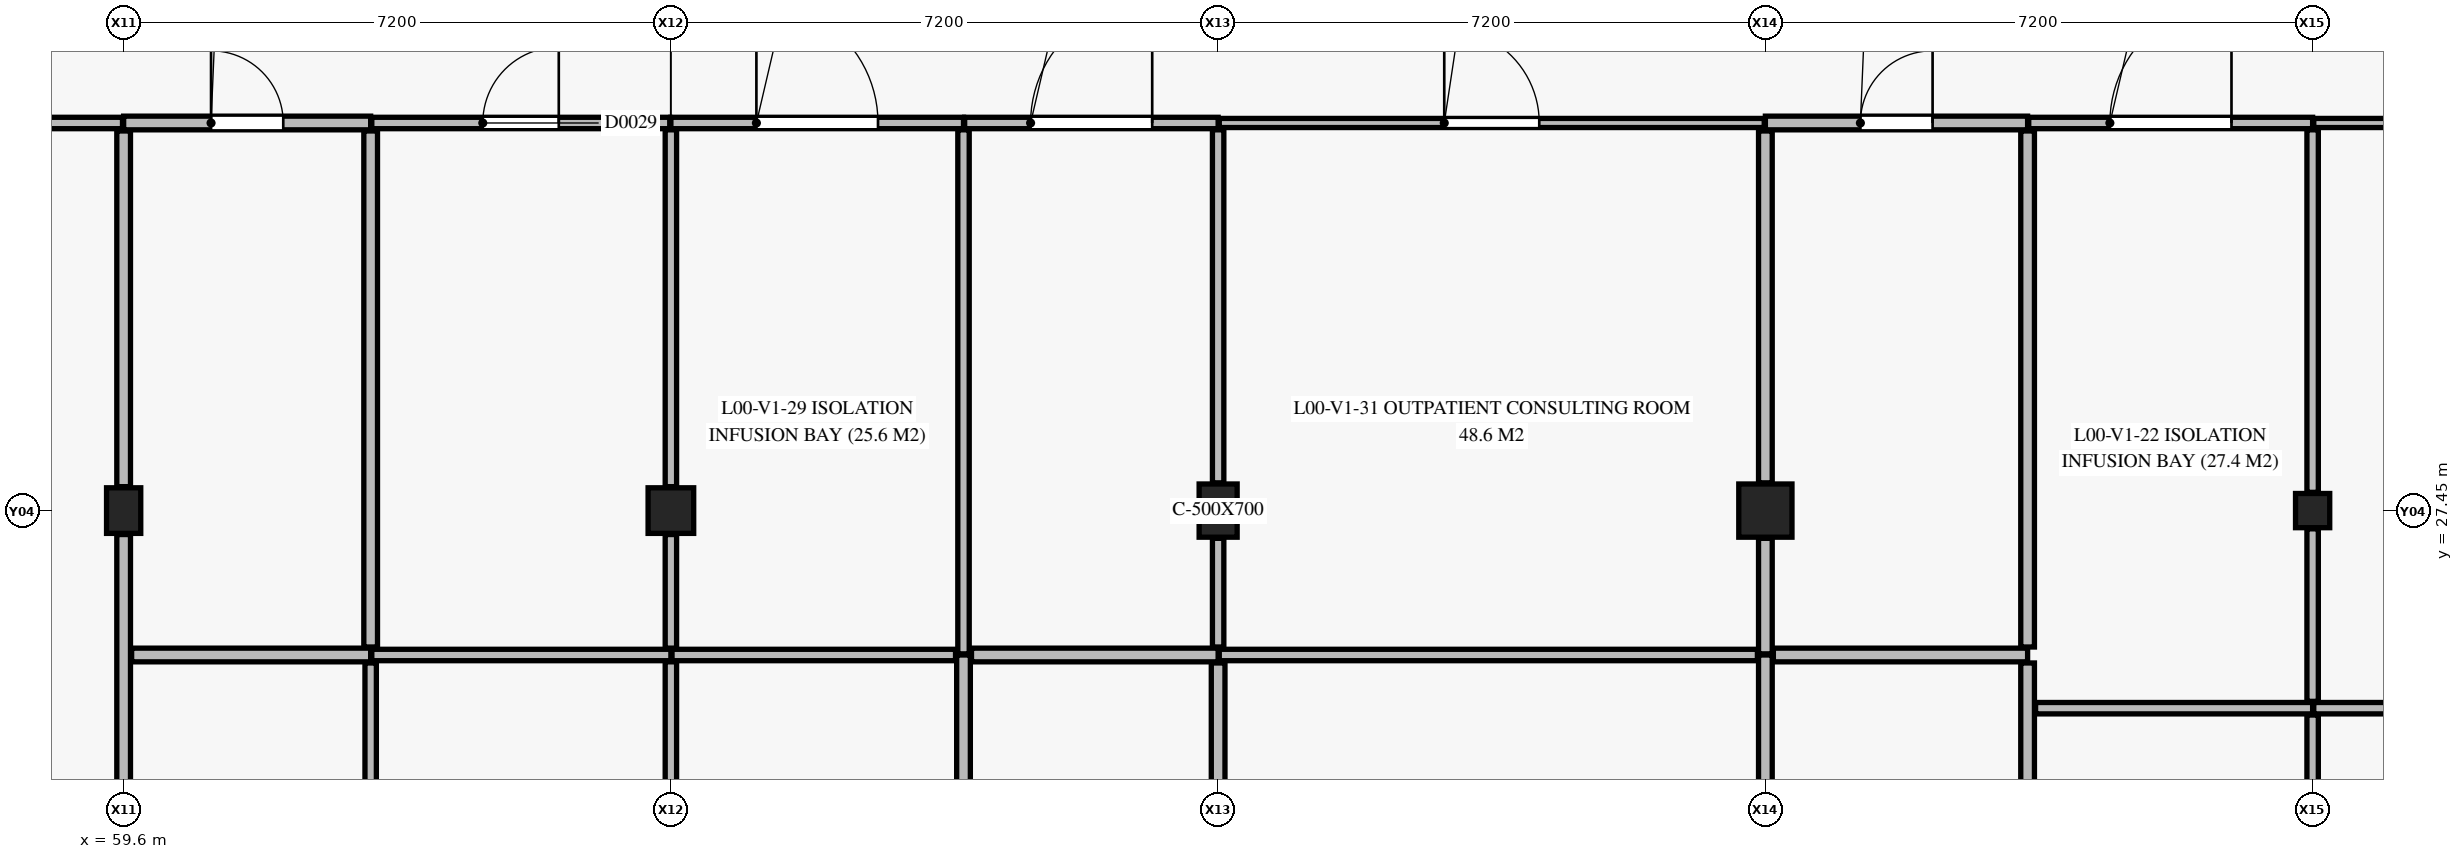
"""IFC4 building model, lengths in metres.
Left out: names, types, materials, properties, quantities, classifications, styles, units other than length and angle.
Written with IfcOpenShell. Run it as: python <this file> out.ifc"""

import sys

from ifc_helpers import new_model, si_unit, direction, frame, frame_2d, origin, origin_2d, place, context, subcontext, project, spatial, rectangle, extrude, element, fill, save


model = new_model("IFC4")
c1 = context("Model", 3, precision=1e-05, world=origin(), true_north=direction((0.0, 1.0)))
c2 = subcontext(c1, "Body", "Model", "MODEL_VIEW")
j1 = project(units=[si_unit("LENGTHUNIT", "METRE"), si_unit("PLANEANGLEUNIT", "RADIAN")], contexts=[c1])
p1 = place(None, origin())
s1 = spatial("IfcSite", under=j1, at=p1, CompositionType="ELEMENT")
p2 = place(p1, origin())
s2 = spatial("IfcBuilding", under=s1, at=p2, CompositionType="ELEMENT")
p3 = place(p2, origin())
s3 = spatial("IfcBuildingStorey", under=s2, at=p3, CompositionType="ELEMENT", Elevation=0.0)
p4 = place(p3, frame((59.6, 27.45, 0.0), z_axis=(0.0, 0.0, 1.0), x_axis=(1.0, 0.0, 0.0)))
e1 = element("IfcColumn", 1, at=p4, inside=s3, PredefinedType="COLUMN", context=c2, shape_type="SweptSolid", body=[
    extrude(rectangle(XDim=0.45, YDim=0.6, at=origin_2d()), origin(), (0.0, 0.0, 1.0), 4.8),
])
p5 = place(p3, frame((66.8, 27.45, 0.0), z_axis=(0.0, 0.0, 1.0), x_axis=(1.0, 0.0, 0.0)))
e2 = element("IfcColumn", 2, at=p5, inside=s3, PredefinedType="COLUMN", context=c2, shape_type="SweptSolid", body=[
    extrude(rectangle(XDim=0.6, YDim=0.6, at=origin_2d()), origin(), (0.0, 0.0, 1.0), 4.65),
])
p6 = place(p3, frame((74.0, 27.45, 0.0), z_axis=(0.0, 0.0, 1.0), x_axis=(1.0, 0.0, 0.0)))
e3 = element("IfcColumn", 3, at=p6, inside=s3, PredefinedType="COLUMN", context=c2, shape_type="SweptSolid", body=[
    extrude(rectangle(XDim=0.5, YDim=0.7, at=origin_2d()), origin(), (0.0, 0.0, 1.0), 4.65),
])
p7 = place(p3, frame((81.2, 27.45, 0.0), z_axis=(0.0, 0.0, 1.0), x_axis=(1.0, 0.0, 0.0)))
e4 = element("IfcColumn", 4, at=p7, inside=s3, PredefinedType="COLUMN", context=c2, shape_type="SweptSolid", body=[
    extrude(rectangle(XDim=0.7, YDim=0.7, at=origin_2d()), origin(), (0.0, 0.0, 1.0), 4.65),
])
p8 = place(p3, frame((88.4, 27.45, 0.0), z_axis=(0.0, 0.0, 1.0), x_axis=(1.0, 0.0, 0.0)))
e5 = element("IfcColumn", 5, at=p8, inside=s3, PredefinedType="COLUMN", context=c2, shape_type="SweptSolid", body=[
    extrude(rectangle(XDim=0.45, YDim=0.45, at=origin_2d()), origin(), (0.0, 0.0, 1.0), 4.65),
])
p9 = place(p3, frame((59.6, 32.55, 0.0), z_axis=(0.0, 0.0, 1.0), x_axis=(1.0, 0.0, 0.0)))
e6 = element("IfcWall", 6, at=p9, inside=s3, PredefinedType="PLUMBINGWALL", context=c2, shape_type="SweptSolid", body=[
    extrude(rectangle(XDim=3.25, YDim=0.18, at=frame_2d((1.625, 0.0))), origin(), (0.0, 0.0, 1.0), 3.735),
])
p10 = place(p9, frame((1.15, 0.0, 0.0)))
e7 = element("IfcOpeningElement", 7, at=p10, cuts=e6, PredefinedType="OPENING", context=c2, shape_type="SweptSolid", body=[
    extrude(rectangle(XDim=0.95, YDim=2.1, at=frame_2d((0.475, 1.05))), frame((0.0, 0.1, 0.0), z_axis=(0.0, -1.0, 0.0), x_axis=(1.0, 0.0, 0.0)), (0.0, 0.0, 1.0), 0.2),
])
p11 = place(p3, frame((81.2, 32.55, 0.0), z_axis=(0.0, 0.0, 1.0), x_axis=(1.0, 0.0, 0.0)))
e8 = element("IfcWall", 8, at=p11, inside=s3, PredefinedType="PLUMBINGWALL", context=c2, shape_type="SweptSolid", body=[
    extrude(rectangle(XDim=3.45, YDim=0.18, at=frame_2d((1.725, 0.0))), origin(), (0.0, 0.0, 1.0), 4.55),
])
p12 = place(p11, frame((1.25, 0.0, 0.0)))
e9 = element("IfcOpeningElement", 9, at=p12, cuts=e8, PredefinedType="OPENING", context=c2, shape_type="SweptSolid", body=[
    extrude(rectangle(XDim=0.95, YDim=2.1, at=frame_2d((0.475, 1.05))), frame((0.0, 0.1, 0.0), z_axis=(0.0, -1.0, 0.0), x_axis=(1.0, 0.0, 0.0)), (0.0, 0.0, 1.0), 0.2),
])
p13 = place(p3, frame((84.665, 32.55, 0.0), z_axis=(0.0, 0.0, 1.0), x_axis=(1.0, 0.0, 0.0)))
e10 = element("IfcWall", 10, at=p13, inside=s3, PredefinedType="PARTITIONING", context=c2, shape_type="SweptSolid", body=[
    extrude(rectangle(XDim=3.735, YDim=0.15, at=frame_2d((1.867, 0.0))), origin(), (0.0, 0.0, 1.0), 4.55),
])
p14 = place(p13, frame((1.067, 0.0, 0.0)))
e11 = element("IfcOpeningElement", 11, at=p14, cuts=e10, PredefinedType="OPENING", context=c2, shape_type="SweptSolid", body=[
    extrude(rectangle(XDim=1.6, YDim=2.25, at=frame_2d((0.8, 1.125))), frame((0.0, 0.085, 0.0), z_axis=(0.0, -1.0, 0.0), x_axis=(1.0, 0.0, 0.0)), (0.0, 0.0, 1.0), 0.17),
])
p15 = place(p3, frame((66.8, 32.55, 0.0), z_axis=(0.0, 0.0, 1.0), x_axis=(1.0, 0.0, 0.0)))
e12 = element("IfcWall", 12, at=p15, inside=s3, PredefinedType="PARTITIONING", context=c2, shape_type="SweptSolid", body=[
    extrude(rectangle(XDim=3.85, YDim=0.15, at=frame_2d((1.925, 0.0))), origin(), (0.0, 0.0, 1.0), 4.55),
])
p16 = place(p15, frame((1.125, 0.0, 0.0)))
e13 = element("IfcOpeningElement", 13, at=p16, cuts=e12, PredefinedType="OPENING", context=c2, shape_type="SweptSolid", body=[
    extrude(rectangle(XDim=1.6, YDim=2.25, at=frame_2d((0.8, 1.125))), frame((0.0, 0.085, 0.0), z_axis=(0.0, -1.0, 0.0), x_axis=(1.0, 0.0, 0.0)), (0.0, 0.0, 1.0), 0.17),
])
p17 = place(p3, frame((57.125, 32.55, 0.0), z_axis=(0.0, 0.0, 1.0), x_axis=(1.0, 0.0, 0.0)))
e14 = element("IfcWall", 14, at=p17, inside=s3, PredefinedType="PARTITIONING", context=c2, shape_type="SweptSolid", body=[
    extrude(rectangle(XDim=2.46, YDim=0.15, at=frame_2d((1.23, 0.0))), origin(), (0.0, 0.0, 1.0), 3.735),
])
p18 = place(p3, frame((62.865, 32.55, 0.0), z_axis=(0.0, 0.0, 1.0), x_axis=(1.0, 0.0, 0.0)))
e15 = element("IfcWall", 15, at=p18, inside=s3, PredefinedType="PARTITIONING", context=c2, shape_type="SweptSolid", body=[
    extrude(rectangle(XDim=3.92, YDim=0.15, at=frame_2d((1.96, 0.0))), origin(), (0.0, 0.0, 1.0), 4.55),
])
p19 = place(p18, frame((1.46, 0.0, 0.0)))
e16 = element("IfcOpeningElement", 16, at=p19, cuts=e15, PredefinedType="OPENING", context=c2, shape_type="SweptSolid", body=[
    extrude(rectangle(XDim=1.0, YDim=2.15, at=frame_2d((0.5, 1.075))), frame((0.0, 0.085, 0.0), z_axis=(0.0, -1.0, 0.0), x_axis=(1.0, 0.0, 0.0)), (0.0, 0.0, 1.0), 0.17),
])
p20 = place(p3, frame((70.665, 32.55, 0.0), z_axis=(0.0, 0.0, 1.0), x_axis=(1.0, 0.0, 0.0)))
e17 = element("IfcWall", 17, at=p20, inside=s3, PredefinedType="PARTITIONING", context=c2, shape_type="SweptSolid", body=[
    extrude(rectangle(XDim=3.335, YDim=0.15, at=frame_2d((1.667, 0.0))), origin(), (0.0, 0.0, 1.0), 4.55),
])
p21 = place(p20, frame((0.867, 0.0, 0.0)))
e18 = element("IfcOpeningElement", 18, at=p21, cuts=e17, PredefinedType="OPENING", context=c2, shape_type="SweptSolid", body=[
    extrude(rectangle(XDim=1.6, YDim=2.25, at=frame_2d((0.8, 1.125))), frame((0.0, 0.085, 0.0), z_axis=(0.0, -1.0, 0.0), x_axis=(1.0, 0.0, 0.0)), (0.0, 0.0, 1.0), 0.17),
])
p22 = place(p3, frame((88.415, 32.55, 0.0), z_axis=(0.0, 0.0, 1.0), x_axis=(1.0, 0.0, 0.0)))
e19 = element("IfcWall", 19, at=p22, inside=s3, PredefinedType="PARTITIONING", context=c2, shape_type="SweptSolid", body=[
    extrude(rectangle(XDim=4.07, YDim=0.12, at=frame_2d((2.035, 0.0))), origin(), (0.0, 0.0, 1.0), 4.55),
])
p23 = place(p22, frame((1.56, 0.0, 0.0)))
e20 = element("IfcOpeningElement", 20, at=p23, cuts=e19, PredefinedType="OPENING", context=c2, shape_type="SweptSolid", body=[
    extrude(rectangle(XDim=0.95, YDim=2.1, at=frame_2d((0.475, 1.05))), frame((0.0, 0.07, 0.0), z_axis=(0.0, -1.0, 0.0), x_axis=(1.0, 0.0, 0.0)), (0.0, 0.0, 1.0), 0.14),
])
p24 = place(p3, frame((74.015, 32.55, 0.0), z_axis=(0.0, 0.0, 1.0), x_axis=(1.0, 0.0, 0.0)))
e21 = element("IfcWall", 21, at=p24, inside=s3, PredefinedType="PARTITIONING", context=c2, shape_type="SweptSolid", body=[
    extrude(rectangle(XDim=7.17, YDim=0.12, at=frame_2d((3.585, 0.0))), origin(), (0.0, 0.0, 1.0), 4.55),
])
p25 = place(p24, frame((2.96, 0.0, 0.0)))
e22 = element("IfcOpeningElement", 22, at=p25, cuts=e21, PredefinedType="OPENING", context=c2, shape_type="SweptSolid", body=[
    extrude(rectangle(XDim=1.25, YDim=2.15, at=frame_2d((0.625, 1.075))), frame((0.0, 0.07, 0.0), z_axis=(0.0, -1.0, 0.0), x_axis=(1.0, 0.0, 0.0)), (0.0, 0.0, 1.0), 0.14),
])
p26 = place(p3, frame((59.6, 20.59, 0.0), z_axis=(0.0, 0.0, 1.0), x_axis=(0.0, 1.0, 0.0)))
e23 = element("IfcWall", 23, at=p26, inside=s3, PredefinedType="PLUMBINGWALL", context=c2, shape_type="SweptSolid", body=[
    extrude(rectangle(XDim=6.545, YDim=0.18, at=frame_2d((3.272, 0.0))), origin(), (0.0, 0.0, 1.0), 3.985),
])
p27 = place(p3, frame((59.6, 27.765, 0.0), z_axis=(0.0, 0.0, 1.0), x_axis=(0.0, 1.0, 0.0)))
e24 = element("IfcWall", 24, at=p27, inside=s3, PredefinedType="PLUMBINGWALL", context=c2, shape_type="SweptSolid", body=[
    extrude(rectangle(XDim=4.68, YDim=0.18, at=frame_2d((2.34, 0.0))), origin(), (0.0, 0.0, 1.0), 3.735),
])
p28 = place(p3, frame((59.705, 25.55, 0.0), z_axis=(0.0, 0.0, 1.0), x_axis=(1.0, 0.0, 0.0)))
e25 = element("IfcWall", 25, at=p28, inside=s3, PredefinedType="PLUMBINGWALL", context=c2, shape_type="SweptSolid", body=[
    extrude(rectangle(XDim=3.145, YDim=0.18, at=frame_2d((1.573, 0.0))), origin(), (0.0, 0.0, 1.0), 4.55),
])
p29 = place(p3, frame((70.65, 17.955, 0.0), z_axis=(0.0, 0.0, 1.0), x_axis=(0.0, 1.0, 0.0)))
e26 = element("IfcWall", 26, at=p29, inside=s3, PredefinedType="PLUMBINGWALL", context=c2, shape_type="SweptSolid", body=[
    extrude(rectangle(XDim=7.595, YDim=0.18, at=frame_2d((3.797, 0.0))), origin(), (0.0, 0.0, 1.0), 3.955),
])
p30 = place(p3, frame((70.755, 25.55, 0.0), z_axis=(0.0, 0.0, 1.0), x_axis=(1.0, 0.0, 0.0)))
e27 = element("IfcWall", 27, at=p30, inside=s3, PredefinedType="PLUMBINGWALL", context=c2, shape_type="SweptSolid", body=[
    extrude(rectangle(XDim=3.245, YDim=0.18, at=frame_2d((1.623, 0.0))), origin(), (0.0, 0.0, 1.0), 4.55),
])
p31 = place(p3, frame((74.0, 20.465, 0.0), z_axis=(0.0, 0.0, 1.0), x_axis=(0.0, 1.0, 0.0)))
e28 = element("IfcWall", 28, at=p31, inside=s3, PredefinedType="PLUMBINGWALL", context=c2, shape_type="SweptSolid", body=[
    extrude(rectangle(XDim=4.98, YDim=0.18, at=frame_2d((2.49, 0.0))), origin(), (0.0, 0.0, 1.0), 4.55),
])
p32 = place(p3, frame((81.2, 20.64, 0.0), z_axis=(0.0, 0.0, 1.0), x_axis=(0.0, 1.0, 0.0)))
e29 = element("IfcWall", 29, at=p32, inside=s3, PredefinedType="PLUMBINGWALL", context=c2, shape_type="SweptSolid", body=[
    extrude(rectangle(XDim=4.91, YDim=0.18, at=frame_2d((2.455, 0.0))), origin(), (0.0, 0.0, 1.0), 4.55),
])
p33 = place(p3, frame((81.305, 25.55, 0.0), z_axis=(0.0, 0.0, 1.0), x_axis=(1.0, 0.0, 0.0)))
e30 = element("IfcWall", 30, at=p33, inside=s3, PredefinedType="PLUMBINGWALL", context=c2, shape_type="SweptSolid", body=[
    extrude(rectangle(XDim=3.345, YDim=0.18, at=frame_2d((1.672, 0.0))), origin(), (0.0, 0.0, 1.0), 4.55),
])
p34 = place(p3, frame((84.65, 17.955, 0.0), z_axis=(0.0, 0.0, 1.0), x_axis=(0.0, 1.0, 0.0)))
e31 = element("IfcWall", 31, at=p34, inside=s3, PredefinedType="PLUMBINGWALL", context=c2, shape_type="SweptSolid", body=[
    extrude(rectangle(XDim=7.49, YDim=0.18, at=frame_2d((3.745, 0.0))), origin(), (0.0, 0.0, 1.0), 3.985),
])
for number, where, z_axis, x_axis in (
    (32, (84.65, 25.655, 0.0), (0.0, 0.0, 1.0), (0.0, 1.0, 0.0)),
    (33, (62.85, 25.655, 0.0), (0.0, 0.0, 1.0), (0.0, 1.0, 0.0)),
):
    element("IfcWall", number, at=place(p3, frame(where, z_axis=z_axis, x_axis=x_axis)), inside=s3, PredefinedType="PLUMBINGWALL", context=c2, shape_type="SweptSolid", body=[
        extrude(rectangle(XDim=6.79, YDim=0.18, at=frame_2d((3.395, 0.0))), origin(), (0.0, 0.0, 1.0), 4.55),
    ])
p35 = place(p3, frame((81.2, 25.565, 0.0), z_axis=(0.0, 0.0, 1.0), x_axis=(0.0, 1.0, 0.0)))
e34 = element("IfcWall", 34, at=p35, inside=s3, PredefinedType="PLUMBINGWALL", context=c2, shape_type="SweptSolid", body=[
    extrude(rectangle(XDim=1.52, YDim=0.18, at=frame_2d((0.76, 0.0))), origin(), (0.0, 0.0, 1.0), 4.55),
])
p36 = place(p3, frame((81.2, 27.815, 0.0), z_axis=(0.0, 0.0, 1.0), x_axis=(0.0, 1.0, 0.0)))
e35 = element("IfcWall", 35, at=p36, inside=s3, PredefinedType="PLUMBINGWALL", context=c2, shape_type="SweptSolid", body=[
    extrude(rectangle(XDim=4.63, YDim=0.18, at=frame_2d((2.315, 0.0))), origin(), (0.0, 0.0, 1.0), 4.55),
])
p37 = place(p3, frame((62.85, 17.94, 0.0), z_axis=(0.0, 0.0, 1.0), x_axis=(0.0, 1.0, 0.0)))
e36 = element("IfcWall", 36, at=p37, inside=s3, PredefinedType="PARTITIONING", context=c2, shape_type="SweptSolid", body=[
    extrude(rectangle(XDim=7.505, YDim=0.15, at=frame_2d((3.752, 0.0))), origin(), (0.0, 0.0, 1.0), 3.835),
])
p38 = place(p3, frame((62.865, 25.55, 0.0), z_axis=(0.0, 0.0, 1.0), x_axis=(1.0, 0.0, 0.0)))
e37 = element("IfcWall", 37, at=p38, inside=s3, PredefinedType="PARTITIONING", context=c2, shape_type="SweptSolid", body=[
    extrude(rectangle(XDim=3.935, YDim=0.15, at=frame_2d((1.968, 0.0))), origin(), (0.0, 0.0, 1.0), 4.55),
])
p39 = place(p3, frame((66.8, 20.59, 0.0), z_axis=(0.0, 0.0, 1.0), x_axis=(0.0, 1.0, 0.0)))
e38 = element("IfcWall", 38, at=p39, inside=s3, PredefinedType="PARTITIONING", context=c2, shape_type="SweptSolid", body=[
    extrude(rectangle(XDim=4.87, YDim=0.15, at=frame_2d((2.435, 0.0))), origin(), (0.0, 0.0, 1.0), 4.55),
])
p40 = place(p3, frame((66.815, 25.55, 0.0), z_axis=(0.0, 0.0, 1.0), x_axis=(1.0, 0.0, 0.0)))
e39 = element("IfcWall", 39, at=p40, inside=s3, PredefinedType="PARTITIONING", context=c2, shape_type="SweptSolid", body=[
    extrude(rectangle(XDim=3.73, YDim=0.15, at=frame_2d((1.865, 0.0))), origin(), (0.0, 0.0, 1.0), 4.55),
])
p41 = place(p3, frame((74.015, 25.55, 0.0), z_axis=(0.0, 0.0, 1.0), x_axis=(1.0, 0.0, 0.0)))
e40 = element("IfcWall", 40, at=p41, inside=s3, PredefinedType="PARTITIONING", context=c2, shape_type="SweptSolid", body=[
    extrude(rectangle(XDim=7.08, YDim=0.15, at=frame_2d((3.54, 0.0))), origin(), (0.0, 0.0, 1.0), 4.55),
])
p42 = place(p3, frame((84.755, 24.85, 0.0), z_axis=(0.0, 0.0, 1.0), x_axis=(1.0, 0.0, 0.0)))
e41 = element("IfcWall", 41, at=p42, inside=s3, PredefinedType="PARTITIONING", context=c2, shape_type="SweptSolid", body=[
    extrude(rectangle(XDim=3.645, YDim=0.15, at=frame_2d((1.823, 0.0))), origin(), (0.0, 0.0, 1.0), 4.55),
])
p43 = place(p3, frame((88.4, 24.94, 0.0), z_axis=(0.0, 0.0, 1.0), x_axis=(0.0, 1.0, 0.0)))
e42 = element("IfcWall", 42, at=p43, inside=s3, PredefinedType="PARTITIONING", context=c2, shape_type="SweptSolid", body=[
    extrude(rectangle(XDim=2.27, YDim=0.15, at=frame_2d((1.135, 0.0))), origin(), (0.0, 0.0, 1.0), 4.55),
])
p44 = place(p3, frame((88.4, 27.69, 0.0), z_axis=(0.0, 0.0, 1.0), x_axis=(0.0, 1.0, 0.0)))
e43 = element("IfcWall", 43, at=p44, inside=s3, PredefinedType="PARTITIONING", context=c2, shape_type="SweptSolid", body=[
    extrude(rectangle(XDim=4.77, YDim=0.15, at=frame_2d((2.385, 0.0))), origin(), (0.0, 0.0, 1.0), 4.55),
])
p45 = place(p3, frame((66.8, 25.64, 0.0), z_axis=(0.0, 0.0, 1.0), x_axis=(0.0, 1.0, 0.0)))
e44 = element("IfcWall", 44, at=p45, inside=s3, PredefinedType="PARTITIONING", context=c2, shape_type="SweptSolid", body=[
    extrude(rectangle(XDim=1.495, YDim=0.15, at=frame_2d((0.748, 0.0))), origin(), (0.0, 0.0, 1.0), 4.55),
])
p46 = place(p3, frame((66.8, 27.765, 0.0), z_axis=(0.0, 0.0, 1.0), x_axis=(0.0, 1.0, 0.0)))
e45 = element("IfcWall", 45, at=p46, inside=s3, PredefinedType="PARTITIONING", context=c2, shape_type="SweptSolid", body=[
    extrude(rectangle(XDim=4.695, YDim=0.15, at=frame_2d((2.348, 0.0))), origin(), (0.0, 0.0, 1.0), 4.55),
])
p47 = place(p3, frame((70.65, 25.565, 0.0), z_axis=(0.0, 0.0, 1.0), x_axis=(0.0, 1.0, 0.0)))
e46 = element("IfcWall", 46, at=p47, inside=s3, PredefinedType="PARTITIONING", context=c2, shape_type="SweptSolid", body=[
    extrude(rectangle(XDim=6.895, YDim=0.15, at=frame_2d((3.448, 0.0))), origin(), (0.0, 0.0, 1.0), 4.55),
])
p48 = place(p3, frame((88.4, 20.515, 0.0), z_axis=(0.0, 0.0, 1.0), x_axis=(0.0, 1.0, 0.0)))
e47 = element("IfcWall", 47, at=p48, inside=s3, PredefinedType="PARTITIONING", context=c2, shape_type="SweptSolid", body=[
    extrude(rectangle(XDim=4.245, YDim=0.15, at=frame_2d((2.123, 0.0))), origin(), (0.0, 0.0, 1.0), 4.55),
])
p49 = place(p3, frame((88.415, 24.85, 0.0), z_axis=(0.0, 0.0, 1.0), x_axis=(1.0, 0.0, 0.0)))
e48 = element("IfcWall", 48, at=p49, inside=s3, PredefinedType="PARTITIONING", context=c2, shape_type="SweptSolid", body=[
    extrude(rectangle(XDim=3.98, YDim=0.15, at=frame_2d((1.99, 0.0))), origin(), (0.0, 0.0, 1.0), 4.55),
])
p50 = place(p3, frame((74.0, 25.655, 0.0), z_axis=(0.0, 0.0, 1.0), x_axis=(0.0, 1.0, 0.0)))
e49 = element("IfcWall", 49, at=p50, inside=s3, PredefinedType="PARTITIONING", context=c2, shape_type="SweptSolid", body=[
    extrude(rectangle(XDim=1.43, YDim=0.15, at=frame_2d((0.715, 0.0))), origin(), (0.0, 0.0, 1.0), 4.55),
])
p51 = place(p3, frame((74.0, 27.815, 0.0), z_axis=(0.0, 0.0, 1.0), x_axis=(0.0, 1.0, 0.0)))
e50 = element("IfcWall", 50, at=p51, inside=s3, PredefinedType="PARTITIONING", context=c2, shape_type="SweptSolid", body=[
    extrude(rectangle(XDim=4.645, YDim=0.15, at=frame_2d((2.323, 0.0))), origin(), (0.0, 0.0, 1.0), 4.55),
])
p52 = place(p14, origin())
e51 = element("IfcDoor", 51, at=p52, inside=s3, OperationType="SINGLE_SWING_RIGHT", PredefinedType="DOOR", context=c2, shape_type="SweptSolid", body=[
    extrude(rectangle(XDim=1.6, YDim=2.25, at=frame_2d((0.8, 1.125))), frame((0.0, 0.025, 0.0), z_axis=(0.0, -1.0, 0.0), x_axis=(1.0, 0.0, 0.0)), (0.0, 0.0, 1.0), 0.05),
])
fill(e11, e51)
p53 = place(p10, origin())
e52 = element("IfcDoor", 52, at=p53, inside=s3, OperationType="SINGLE_SWING_LEFT", PredefinedType="DOOR", context=c2, shape_type="SweptSolid", body=[
    extrude(rectangle(XDim=0.95, YDim=2.1, at=frame_2d((0.475, 1.05))), frame((0.0, 0.025, 0.0), z_axis=(0.0, -1.0, 0.0), x_axis=(1.0, 0.0, 0.0)), (0.0, 0.0, 1.0), 0.05),
])
fill(e7, e52)
p54 = place(p19, origin())
e53 = element("IfcDoor", 53, at=p54, inside=s3, OperationType="SINGLE_SWING_RIGHT", PredefinedType="DOOR", context=c2, shape_type="SweptSolid", body=[
    extrude(rectangle(XDim=1.0, YDim=2.15, at=frame_2d((0.5, 1.075))), frame((0.0, 0.025, 0.0), z_axis=(0.0, -1.0, 0.0), x_axis=(1.0, 0.0, 0.0)), (0.0, 0.0, 1.0), 0.05),
])
fill(e16, e53)
p55 = place(p16, origin())
e54 = element("IfcDoor", 54, at=p55, inside=s3, OperationType="SINGLE_SWING_LEFT", PredefinedType="DOOR", context=c2, shape_type="SweptSolid", body=[
    extrude(rectangle(XDim=1.6, YDim=2.25, at=frame_2d((0.8, 1.125))), frame((0.0, 0.025, 0.0), z_axis=(0.0, -1.0, 0.0), x_axis=(1.0, 0.0, 0.0)), (0.0, 0.0, 1.0), 0.05),
])
fill(e13, e54)
p56 = place(p21, origin())
e55 = element("IfcDoor", 55, at=p56, inside=s3, OperationType="SINGLE_SWING_RIGHT", PredefinedType="DOOR", context=c2, shape_type="SweptSolid", body=[
    extrude(rectangle(XDim=1.6, YDim=2.25, at=frame_2d((0.8, 1.125))), frame((0.0, 0.025, 0.0), z_axis=(0.0, -1.0, 0.0), x_axis=(1.0, 0.0, 0.0)), (0.0, 0.0, 1.0), 0.05),
])
fill(e18, e55)
p57 = place(p25, origin())
e56 = element("IfcDoor", 56, at=p57, inside=s3, OperationType="SINGLE_SWING_LEFT", PredefinedType="DOOR", context=c2, shape_type="SweptSolid", body=[
    extrude(rectangle(XDim=1.25, YDim=2.15, at=frame_2d((0.625, 1.075))), frame((0.0, 0.025, 0.0), z_axis=(0.0, -1.0, 0.0), x_axis=(1.0, 0.0, 0.0)), (0.0, 0.0, 1.0), 0.05),
])
fill(e22, e56)
p58 = place(p12, origin())
e57 = element("IfcDoor", 57, at=p58, inside=s3, OperationType="SINGLE_SWING_RIGHT", PredefinedType="DOOR", context=c2, shape_type="SweptSolid", body=[
    extrude(rectangle(XDim=0.95, YDim=2.1, at=frame_2d((0.475, 1.05))), frame((0.0, 0.025, 0.0), z_axis=(0.0, -1.0, 0.0), x_axis=(1.0, 0.0, 0.0)), (0.0, 0.0, 1.0), 0.05),
])
fill(e9, e57)
save(model, sys.argv[1])
